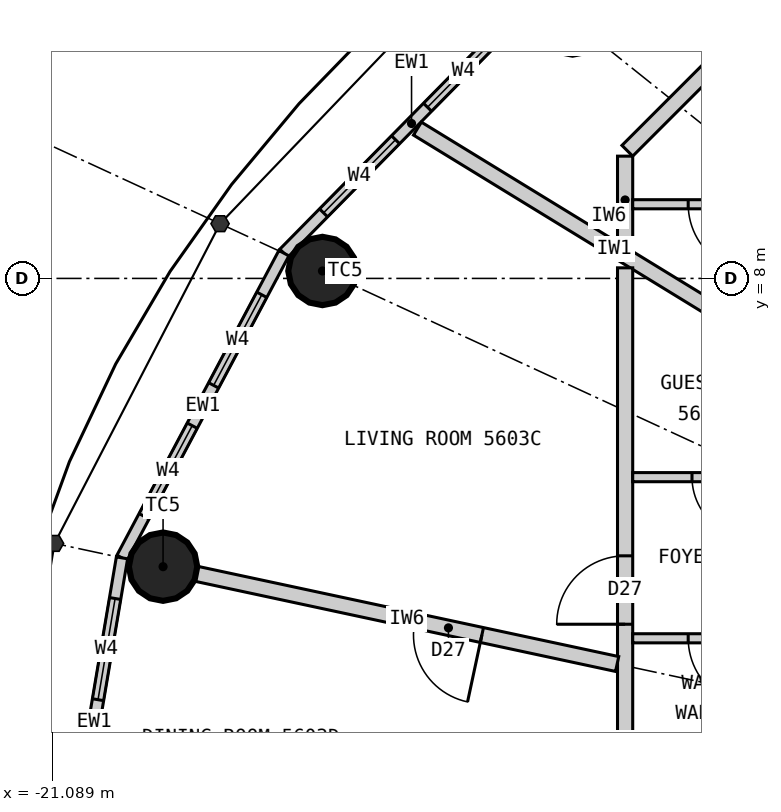
"""IFC4 building model, lengths in metres.
Left out: names, types, materials, properties, quantities, classifications, styles, units other than length and angle.
Written with IfcOpenShell. Run it as: python <this file> out.ifc"""

import sys

from ifc_helpers import new_model, si_unit, direction, frame, frame_2d, origin, origin_2d, place, context, subcontext, project, spatial, rectangle, circle, extrude, element, fill, save


model = new_model("IFC4")
c1 = context("Model", 3, precision=1e-05, world=origin(), true_north=direction((0.0, 1.0)))
c2 = subcontext(c1, "Body", "Model", "MODEL_VIEW")
j1 = project(units=[si_unit("LENGTHUNIT", "METRE"), si_unit("PLANEANGLEUNIT", "RADIAN")], contexts=[c1])
p1 = place(None, origin())
s1 = spatial("IfcSite", under=j1, at=p1, CompositionType="ELEMENT")
p2 = place(p1, origin())
s2 = spatial("IfcBuilding", under=s1, at=p2, CompositionType="ELEMENT")
p3 = place(p2, frame((0.0, 0.0, 209.4)))
s3 = spatial("IfcBuildingStorey", under=s2, at=p3, CompositionType="ELEMENT", Elevation=209.4)
for number, where, z_axis, x_axis in (
    (1, (-14.241, 11.393, 0.0), (0.0, 0.0, 1.0), (1.0, 0.0, 0.0)),
    (2, (-17.532, 8.098, 0.0), (0.0, 0.0, 1.0), (1.0, 0.0, 0.0)),
    (3, (-19.629, 4.208, 0.0), (0.0, 0.0, 1.0), (1.0, 0.0, 0.0)),
):
    element("IfcColumn", number, at=place(p3, frame(where, z_axis=z_axis, x_axis=x_axis)), inside=s3, PredefinedType="COLUMN", context=c2, shape_type="SweptSolid", body=[
        extrude(circle(Radius=0.45, at=origin_2d()), origin(), (0.0, 0.0, 1.0), 3.3),
    ])
p4 = place(p3, frame((-14.68, 11.744, 0.0), z_axis=(0.0, 0.0, 1.0), x_axis=(-0.701527379618, -0.712642501993, 0.0)))
e4 = element("IfcWall", 4, at=p4, inside=s3, PredefinedType="ELEMENTEDWALL", context=c2, shape_type="SweptSolid", body=[
    extrude(rectangle(XDim=4.788, YDim=0.15, at=frame_2d((2.394, 0.0))), origin(), (0.0, 0.0, 1.0), 3.12),
])
p5 = place(p4, frame((0.744, 0.0, 0.9)))
e5 = element("IfcOpeningElement", 5, at=p5, cuts=e4, PredefinedType="OPENING", context=c2, shape_type="SweptSolid", body=[
    extrude(rectangle(XDim=1.35, YDim=1.9, at=frame_2d((0.675, 0.95))), frame((0.0, 0.085, 0.0), z_axis=(0.0, -1.0, 0.0), x_axis=(1.0, 0.0, 0.0)), (0.0, 0.0, 1.0), 0.17),
])
p6 = place(p4, frame((2.694, 0.0, 0.9)))
e6 = element("IfcOpeningElement", 6, at=p6, cuts=e4, PredefinedType="OPENING", context=c2, shape_type="SweptSolid", body=[
    extrude(rectangle(XDim=1.35, YDim=1.9, at=frame_2d((0.675, 0.95))), frame((0.0, 0.085, 0.0), z_axis=(0.0, -1.0, 0.0), x_axis=(1.0, 0.0, 0.0)), (0.0, 0.0, 1.0), 0.17),
])
p7 = place(p3, frame((-18.04, 8.332, 0.0), z_axis=(0.0, 0.0, 1.0), x_axis=(-0.469256152955, -0.883062094597, 0.0)))
e7 = element("IfcWall", 7, at=p7, inside=s3, PredefinedType="ELEMENTEDWALL", context=c2, shape_type="SweptSolid", body=[
    extrude(rectangle(XDim=4.539, YDim=0.15, at=frame_2d((2.27, 0.0))), origin(), (0.0, 0.0, 1.0), 3.12),
])
p8 = place(p7, frame((0.62, 0.0, 0.9)))
e8 = element("IfcOpeningElement", 8, at=p8, cuts=e7, PredefinedType="OPENING", context=c2, shape_type="SweptSolid", body=[
    extrude(rectangle(XDim=1.35, YDim=1.9, at=frame_2d((0.675, 0.95))), frame((0.0, 0.085, 0.0), z_axis=(0.0, -1.0, 0.0), x_axis=(1.0, 0.0, 0.0)), (0.0, 0.0, 1.0), 0.17),
])
p9 = place(p7, frame((2.57, 0.0, 0.9)))
e9 = element("IfcOpeningElement", 9, at=p9, cuts=e7, PredefinedType="OPENING", context=c2, shape_type="SweptSolid", body=[
    extrude(rectangle(XDim=1.35, YDim=1.9, at=frame_2d((0.675, 0.95))), frame((0.0, 0.085, 0.0), z_axis=(0.0, -1.0, 0.0), x_axis=(1.0, 0.0, 0.0)), (0.0, 0.0, 1.0), 0.17),
])
p10 = place(p3, frame((-20.17, 4.323, 0.0), z_axis=(0.0, 0.0, 1.0), x_axis=(-0.166538513568, -0.986034950445, 0.0)))
e10 = element("IfcWall", 10, at=p10, inside=s3, PredefinedType="ELEMENTEDWALL", context=c2, shape_type="SweptSolid", body=[
    extrude(rectangle(XDim=4.385, YDim=0.15, at=frame_2d((2.192, 0.0))), origin(), (0.0, 0.0, 1.0), 3.12),
])
p11 = place(p10, frame((0.542, 0.0, 0.9)))
e11 = element("IfcOpeningElement", 11, at=p11, cuts=e10, PredefinedType="OPENING", context=c2, shape_type="SweptSolid", body=[
    extrude(rectangle(XDim=1.35, YDim=1.9, at=frame_2d((0.675, 0.95))), frame((0.0, 0.085, 0.0), z_axis=(0.0, -1.0, 0.0), x_axis=(1.0, 0.0, 0.0)), (0.0, 0.0, 1.0), 0.17),
])
p12 = place(p10, frame((2.492, 0.0, 0.9)))
e12 = element("IfcOpeningElement", 12, at=p12, cuts=e10, PredefinedType="OPENING", context=c2, shape_type="SweptSolid", body=[
    extrude(rectangle(XDim=1.35, YDim=1.9, at=frame_2d((0.675, 0.95))), frame((0.0, 0.085, 0.0), z_axis=(0.0, -1.0, 0.0), x_axis=(1.0, 0.0, 0.0)), (0.0, 0.0, 1.0), 0.17),
])
p13 = place(p3, frame((-11.1, 6.797, 0.0), z_axis=(0.0, 0.0, 1.0), x_axis=(-0.852799818179, 0.522237943963, 0.0)))
e13 = element("IfcWall", 13, at=p13, inside=s3, PredefinedType="PARTITIONING", context=c2, shape_type="SweptSolid", body=[
    extrude(rectangle(XDim=6.077, YDim=0.2, at=frame_2d((3.039, 0.0))), origin(), (0.0, 0.0, 1.0), 3.12),
])
p14 = place(p3, frame((-10.679, 12.521, 0.0), z_axis=(0.0, 0.0, 1.0), x_axis=(-0.707106781187, -0.707106781187, 0.0)))
e14 = element("IfcWall", 14, at=p14, inside=s3, PredefinedType="PARTITIONING", context=c2, shape_type="SweptSolid", body=[
    extrude(rectangle(XDim=4.019, YDim=0.2, at=frame_2d((2.009, 0.0))), origin(), (0.0, 0.0, 1.0), 3.12),
])
p15 = place(p3, frame((-13.55, 9.609, 0.0), z_axis=(0.0, 0.0, 1.0), x_axis=(0.0, -1.0, 0.0)))
e15 = element("IfcWall", 15, at=p15, inside=s3, PredefinedType="PARTITIONING", context=c2, shape_type="SweptSolid", body=[
    extrude(rectangle(XDim=1.153, YDim=0.2, at=frame_2d((0.576, 0.0))), origin(), (0.0, 0.0, 1.0), 3.12),
])
p16 = place(p3, frame((-11.1, 8.976, 0.0), z_axis=(0.0, 0.0, 1.0), x_axis=(-1.0, 0.0, 0.0)))
e16 = element("IfcWall", 16, at=p16, inside=s3, PredefinedType="PARTITIONING", context=c2, shape_type="SweptSolid", body=[
    extrude(rectangle(XDim=2.35, YDim=0.12, at=frame_2d((1.175, 0.0))), origin(), (0.0, 0.0, 1.0), 3.12),
])
p17 = place(p16, frame((0.72, 0.0, 0.0)))
e17 = element("IfcOpeningElement", 17, at=p17, cuts=e16, PredefinedType="OPENING", context=c2, shape_type="SweptSolid", body=[
    extrude(rectangle(XDim=0.9, YDim=2.1, at=frame_2d((0.45, 1.05))), frame((0.0, 0.07, 0.0), z_axis=(0.0, -1.0, 0.0), x_axis=(1.0, 0.0, 0.0)), (0.0, 0.0, 1.0), 0.14),
])
p18 = place(p3, frame((-13.55, 8.139, 0.0), z_axis=(0.0, 0.0, 1.0), x_axis=(0.0, -1.0, 0.0)))
e18 = element("IfcWall", 18, at=p18, inside=s3, PredefinedType="PARTITIONING", context=c2, shape_type="SweptSolid", body=[
    extrude(rectangle(XDim=12.496, YDim=0.2, at=frame_2d((6.248, 0.0))), origin(), (0.0, 0.0, 1.0), 3.12),
])
p19 = place(p18, frame((7.031, 0.0, 0.0)))
e19 = element("IfcOpeningElement", 19, at=p19, cuts=e18, PredefinedType="OPENING", context=c2, shape_type="SweptSolid", body=[
    extrude(rectangle(XDim=0.9, YDim=2.1, at=frame_2d((0.45, 1.05))), frame((0.0, 0.11, 0.0), z_axis=(0.0, -1.0, 0.0), x_axis=(1.0, 0.0, 0.0)), (0.0, 0.0, 1.0), 0.22),
])
p20 = place(p18, frame((9.373, 0.0, 0.0)))
e20 = element("IfcOpeningElement", 20, at=p20, cuts=e18, PredefinedType="OPENING", context=c2, shape_type="SweptSolid", body=[
    extrude(rectangle(XDim=0.8, YDim=2.1, at=frame_2d((0.4, 1.05))), frame((0.0, 0.11, 0.0), z_axis=(0.0, -1.0, 0.0), x_axis=(1.0, 0.0, 0.0)), (0.0, 0.0, 1.0), 0.22),
])
p21 = place(p18, frame((3.789, 0.0, 0.0)))
e21 = element("IfcOpeningElement", 21, at=p21, cuts=e18, PredefinedType="OPENING", context=c2, shape_type="SweptSolid", body=[
    extrude(rectangle(XDim=0.9, YDim=2.1, at=frame_2d((0.45, 1.05))), frame((0.0, 0.11, 0.0), z_axis=(0.0, -1.0, 0.0), x_axis=(1.0, 0.0, 0.0)), (0.0, 0.0, 1.0), 0.22),
])
p22 = place(p3, frame((-13.655, 2.927, 0.0), z_axis=(0.0, 0.0, 1.0), x_axis=(-0.977790419294, 0.209585056568, 0.0)))
e22 = element("IfcWall", 22, at=p22, inside=s3, PredefinedType="PARTITIONING", context=c2, shape_type="SweptSolid", body=[
    extrude(rectangle(XDim=5.66, YDim=0.2, at=frame_2d((2.83, 0.0))), origin(), (0.0, 0.0, 1.0), 2.42),
])
p23 = place(p22, frame((1.82, 0.0, 0.0)))
e23 = element("IfcOpeningElement", 23, at=p23, cuts=e22, PredefinedType="OPENING", context=c2, shape_type="SweptSolid", body=[
    extrude(rectangle(XDim=0.9, YDim=2.1, at=frame_2d((0.45, 1.05))), frame((0.0, 0.11, 0.0), z_axis=(0.0, -1.0, 0.0), x_axis=(1.0, 0.0, 0.0)), (0.0, 0.0, 1.0), 0.22),
])
p24 = place(p3, frame((-11.1, 5.385, 0.0), z_axis=(0.0, 0.0, 1.0), x_axis=(-1.0, 0.0, 0.0)))
e24 = element("IfcWall", 24, at=p24, inside=s3, PredefinedType="PARTITIONING", context=c2, shape_type="SweptSolid", body=[
    extrude(rectangle(XDim=2.35, YDim=0.12, at=frame_2d((1.175, 0.0))), origin(), (0.0, 0.0, 1.0), 3.12),
])
p25 = place(p24, frame((0.77, 0.0, 0.0)))
e25 = element("IfcOpeningElement", 25, at=p25, cuts=e24, PredefinedType="OPENING", context=c2, shape_type="SweptSolid", body=[
    extrude(rectangle(XDim=0.8, YDim=2.1, at=frame_2d((0.4, 1.05))), frame((0.0, 0.07, 0.0), z_axis=(0.0, -1.0, 0.0), x_axis=(1.0, 0.0, 0.0)), (0.0, 0.0, 1.0), 0.14),
])
p26 = place(p3, frame((-11.1, 3.265, 0.0), z_axis=(0.0, 0.0, 1.0), x_axis=(-1.0, 0.0, 0.0)))
e26 = element("IfcWall", 26, at=p26, inside=s3, PredefinedType="PARTITIONING", context=c2, shape_type="SweptSolid", body=[
    extrude(rectangle(XDim=2.35, YDim=0.12, at=frame_2d((1.175, 0.0))), origin(), (0.0, 0.0, 1.0), 2.42),
])
p27 = place(p26, frame((0.72, 0.0, 0.0)))
e27 = element("IfcOpeningElement", 27, at=p27, cuts=e26, PredefinedType="OPENING", context=c2, shape_type="SweptSolid", body=[
    extrude(rectangle(XDim=0.9, YDim=2.1, at=frame_2d((0.45, 1.05))), frame((0.0, 0.07, 0.0), z_axis=(0.0, -1.0, 0.0), x_axis=(1.0, 0.0, 0.0)), (0.0, 0.0, 1.0), 0.14),
])
p28 = place(p5, origin())
e28 = element("IfcWindow", 28, at=p28, inside=s3, PartitioningType="SINGLE_PANEL", PredefinedType="WINDOW", context=c2, shape_type="SweptSolid", body=[
    extrude(rectangle(XDim=1.35, YDim=1.9, at=frame_2d((0.675, 0.95))), frame((0.0, 0.03, 0.0), z_axis=(0.0, -1.0, 0.0), x_axis=(1.0, 0.0, 0.0)), (0.0, 0.0, 1.0), 0.06),
])
fill(e5, e28)
p29 = place(p6, origin())
e29 = element("IfcWindow", 29, at=p29, inside=s3, PartitioningType="SINGLE_PANEL", PredefinedType="WINDOW", context=c2, shape_type="SweptSolid", body=[
    extrude(rectangle(XDim=1.35, YDim=1.9, at=frame_2d((0.675, 0.95))), frame((0.0, 0.03, 0.0), z_axis=(0.0, -1.0, 0.0), x_axis=(1.0, 0.0, 0.0)), (0.0, 0.0, 1.0), 0.06),
])
fill(e6, e29)
p30 = place(p8, origin())
e30 = element("IfcWindow", 30, at=p30, inside=s3, PartitioningType="SINGLE_PANEL", PredefinedType="WINDOW", context=c2, shape_type="SweptSolid", body=[
    extrude(rectangle(XDim=1.35, YDim=1.9, at=frame_2d((0.675, 0.95))), frame((0.0, 0.03, 0.0), z_axis=(0.0, -1.0, 0.0), x_axis=(1.0, 0.0, 0.0)), (0.0, 0.0, 1.0), 0.06),
])
fill(e8, e30)
p31 = place(p9, origin())
e31 = element("IfcWindow", 31, at=p31, inside=s3, PartitioningType="SINGLE_PANEL", PredefinedType="WINDOW", context=c2, shape_type="SweptSolid", body=[
    extrude(rectangle(XDim=1.35, YDim=1.9, at=frame_2d((0.675, 0.95))), frame((0.0, 0.03, 0.0), z_axis=(0.0, -1.0, 0.0), x_axis=(1.0, 0.0, 0.0)), (0.0, 0.0, 1.0), 0.06),
])
fill(e9, e31)
p32 = place(p11, origin())
e32 = element("IfcWindow", 32, at=p32, inside=s3, PartitioningType="SINGLE_PANEL", PredefinedType="WINDOW", context=c2, shape_type="SweptSolid", body=[
    extrude(rectangle(XDim=1.35, YDim=1.9, at=frame_2d((0.675, 0.95))), frame((0.0, 0.03, 0.0), z_axis=(0.0, -1.0, 0.0), x_axis=(1.0, 0.0, 0.0)), (0.0, 0.0, 1.0), 0.06),
])
fill(e11, e32)
p33 = place(p17, origin())
e33 = element("IfcDoor", 33, at=p33, inside=s3, OperationType="SINGLE_SWING_LEFT", PredefinedType="DOOR", context=c2, shape_type="SweptSolid", body=[
    extrude(rectangle(XDim=0.9, YDim=2.1, at=frame_2d((0.45, 1.05))), frame((0.0, 0.025, 0.0), z_axis=(0.0, -1.0, 0.0), x_axis=(1.0, 0.0, 0.0)), (0.0, 0.0, 1.0), 0.05),
])
fill(e17, e33)
p34 = place(p25, origin())
e34 = element("IfcDoor", 34, at=p34, inside=s3, OperationType="SINGLE_SWING_LEFT", PredefinedType="DOOR", context=c2, shape_type="SweptSolid", body=[
    extrude(rectangle(XDim=0.8, YDim=2.1, at=frame_2d((0.4, 1.05))), frame((0.0, 0.025, 0.0), z_axis=(0.0, -1.0, 0.0), x_axis=(1.0, 0.0, 0.0)), (0.0, 0.0, 1.0), 0.05),
])
fill(e25, e34)
p35 = place(p27, origin())
e35 = element("IfcDoor", 35, at=p35, inside=s3, OperationType="SINGLE_SWING_LEFT", PredefinedType="DOOR", context=c2, shape_type="SweptSolid", body=[
    extrude(rectangle(XDim=0.9, YDim=2.1, at=frame_2d((0.45, 1.05))), frame((0.0, 0.025, 0.0), z_axis=(0.0, -1.0, 0.0), x_axis=(1.0, 0.0, 0.0)), (0.0, 0.0, 1.0), 0.05),
])
fill(e27, e35)
p36 = place(p21, origin())
e36 = element("IfcDoor", 36, at=p36, inside=s3, OperationType="SINGLE_SWING_RIGHT", PredefinedType="DOOR", context=c2, shape_type="SweptSolid", body=[
    extrude(rectangle(XDim=0.9, YDim=2.1, at=frame_2d((0.45, 1.05))), frame((0.0, 0.025, 0.0), z_axis=(0.0, -1.0, 0.0), x_axis=(1.0, 0.0, 0.0)), (0.0, 0.0, 1.0), 0.05),
])
fill(e21, e36)
p37 = place(p23, origin())
e37 = element("IfcDoor", 37, at=p37, inside=s3, OperationType="SINGLE_SWING_LEFT", PredefinedType="DOOR", context=c2, shape_type="SweptSolid", body=[
    extrude(rectangle(XDim=0.9, YDim=2.1, at=frame_2d((0.45, 1.05))), frame((0.0, 0.025, 0.0), z_axis=(0.0, -1.0, 0.0), x_axis=(1.0, 0.0, 0.0)), (0.0, 0.0, 1.0), 0.05),
])
fill(e23, e37)
save(model, sys.argv[1])
